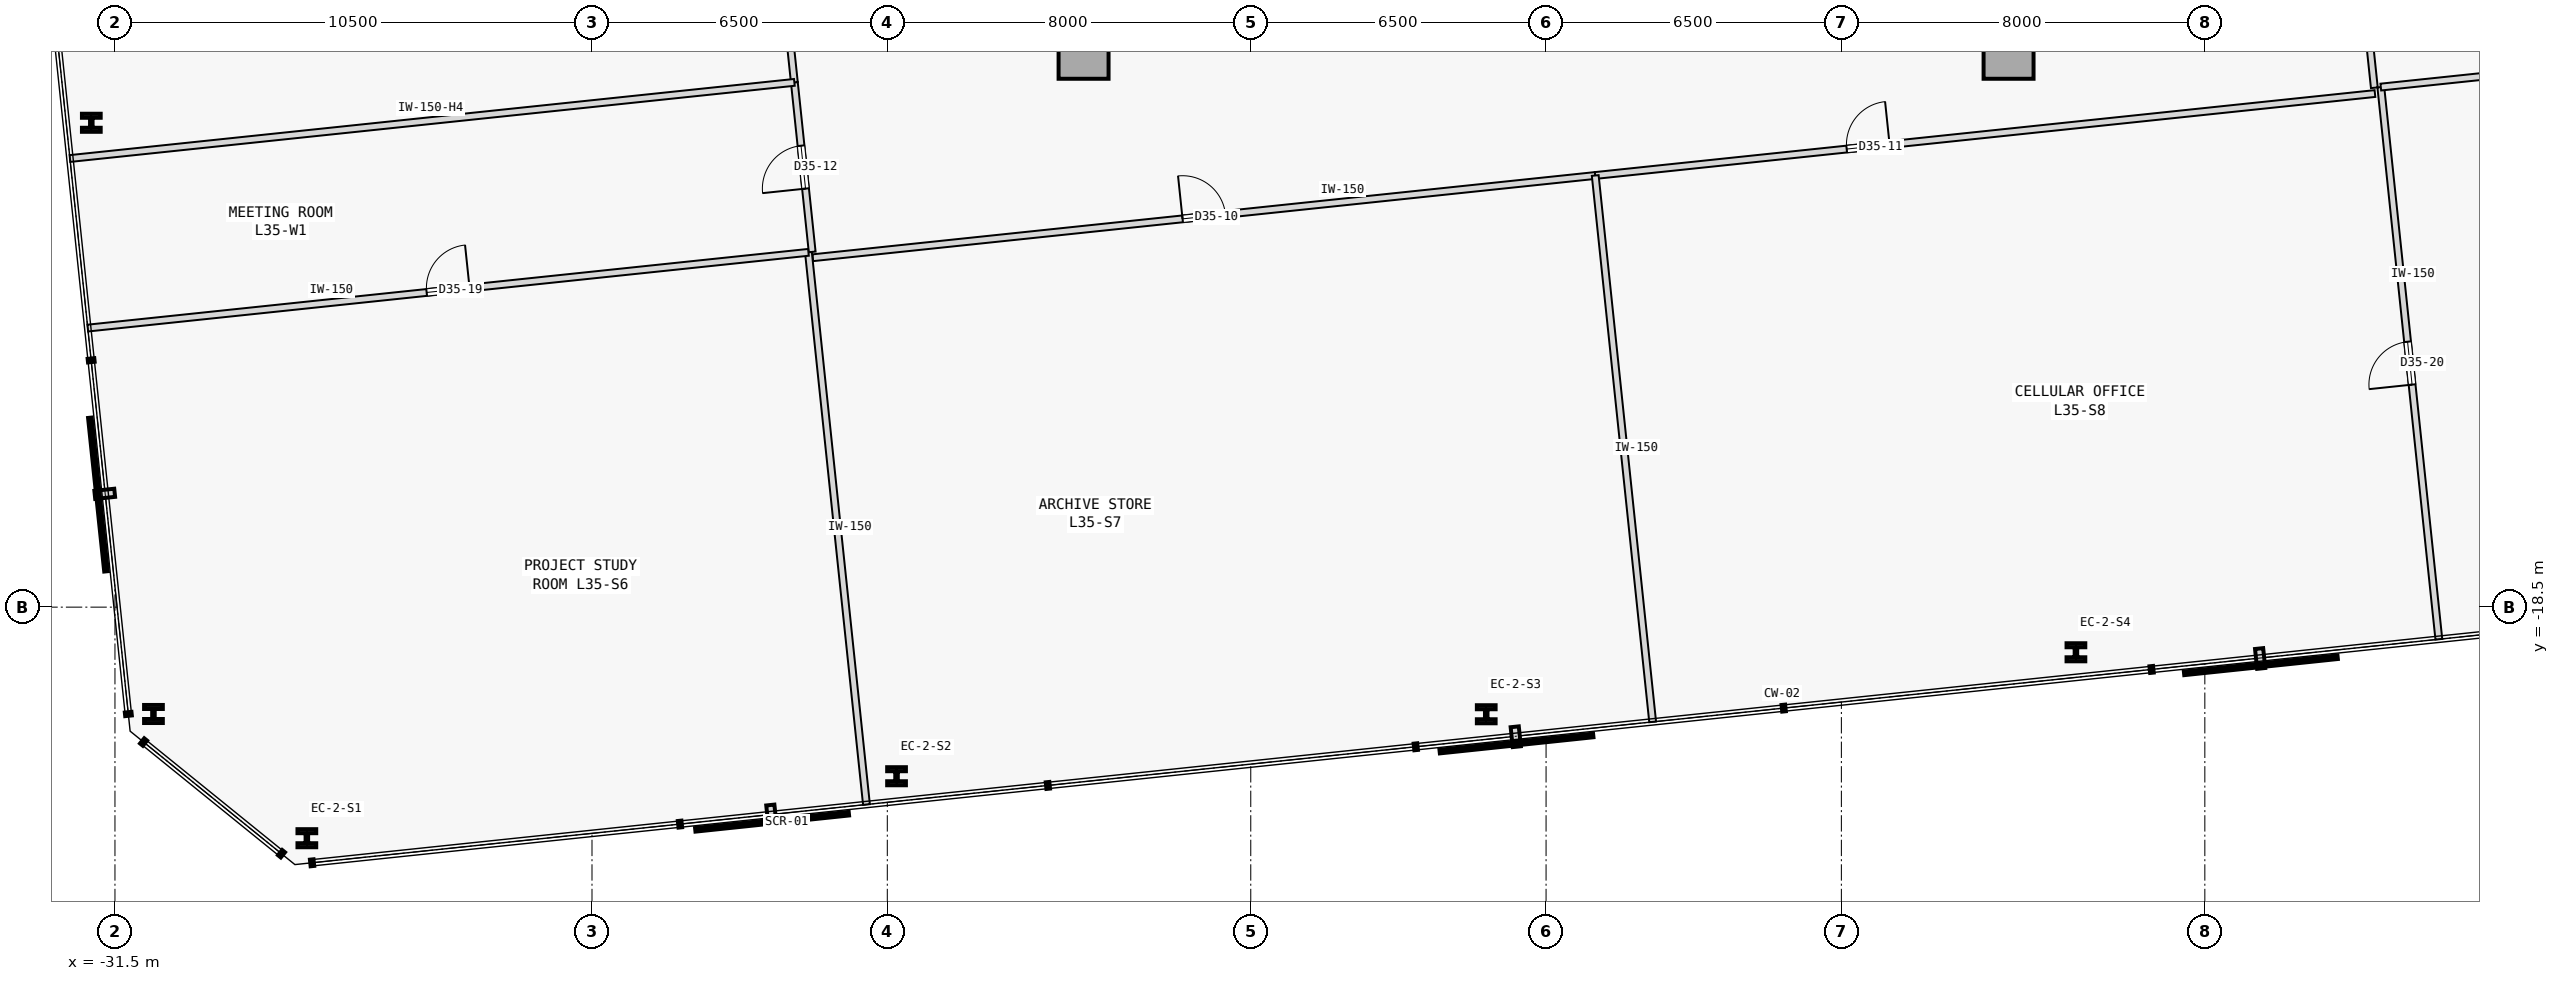
"""IFC4 building model, lengths in metres.
Left out: names, types, materials, properties, quantities, classifications, styles, units other than length and angle.
Written with IfcOpenShell. Run it as: python <this file> out.ifc"""

import sys

from ifc_helpers import new_model, si_unit, direction, frame, frame_2d, origin, origin_2d, place, context, subcontext, project, spatial, rectangle, i_section, extrude, element, fill, save


model = new_model("IFC4")
c1 = context("Model", 3, precision=1e-05, world=origin(), true_north=direction((0.0, 1.0)))
c2 = subcontext(c1, "Body", "Model", "MODEL_VIEW")
j1 = project(units=[si_unit("LENGTHUNIT", "METRE"), si_unit("PLANEANGLEUNIT", "RADIAN")], contexts=[c1])
p1 = place(None, origin())
s1 = spatial("IfcSite", under=j1, at=p1, CompositionType="ELEMENT")
p2 = place(p1, origin())
s2 = spatial("IfcBuilding", under=s1, at=p2, CompositionType="ELEMENT")
p3 = place(p2, frame((0.0, 0.0, 139.2)))
s3 = spatial("IfcBuildingStorey", under=s2, at=p3, CompositionType="ELEMENT", Elevation=139.2)
for number, where, z_axis, x_axis in (
    (1, (-10.18, -6.32, 0.0), (0.0, 0.0, 1.0), (1.0, 0.0, 0.0)),
    (2, (10.18, -6.32, 0.0), (0.0, 0.0, 1.0), (1.0, 0.0, 0.0)),
):
    element("IfcColumn", number, at=place(p3, frame(where, z_axis=z_axis, x_axis=x_axis)), inside=s3, PredefinedType="COLUMN", context=c2, shape_type="SweptSolid", body=[
        extrude(rectangle(XDim=1.1, YDim=1.1, at=origin_2d()), origin(), (0.0, 0.0, 1.0), 3.7),
    ])
for number, where, z_axis, x_axis in (
    (3, (-27.276, -23.586, 0.0), (0.0, 0.0, 1.0), (1.0, 0.0, 0.0)),
    (4, (-14.297, -22.222, 0.0), (0.0, 0.0, 1.0), (1.0, 0.0, 0.0)),
    (5, (-1.317, -20.858, 0.0), (0.0, 0.0, 1.0), (1.0, 0.0, 0.0)),
    (6, (11.663, -19.494, 0.0), (0.0, 0.0, 1.0), (1.0, 0.0, 0.0)),
    (7, (-32.021, -7.838, 0.0), (0.0, 0.0, 1.0), (1.0, 0.0, 0.0)),
    (8, (-30.653, -20.852, 0.0), (0.0, 0.0, 1.0), (1.0, 0.0, 0.0)),
):
    element("IfcColumn", number, at=place(p3, frame(where, z_axis=z_axis, x_axis=x_axis)), inside=s3, PredefinedType="COLUMN", context=c2, shape_type="SweptSolid", body=[
        extrude(i_section(OverallWidth=0.413, OverallDepth=0.398, WebThickness=0.056, FlangeThickness=0.089, FilletRadius=0.015, at=origin_2d()), origin(), (0.0, 0.0, 1.0), 3.7),
    ])
p4 = place(p3, frame((-16.14, -10.809, 0.0), z_axis=(0.0, 0.0, 1.0), x_axis=(0.994522126729, 0.104526261998, 0.0)))
e9 = element("IfcWall", 9, at=p4, inside=s3, PredefinedType="PARTITIONING", context=c2, shape_type="SweptSolid", body=[
    extrude(rectangle(XDim=17.317, YDim=0.15, at=frame_2d((8.658, 0.0))), origin(), (0.0, 0.0, 1.0), 3.3),
])
p5 = place(p4, frame((8.184, 0.0, 0.0)))
e10 = element("IfcOpeningElement", 10, at=p5, cuts=e9, PredefinedType="OPENING", context=c2, shape_type="SweptSolid", body=[
    extrude(rectangle(XDim=0.95, YDim=2.15, at=frame_2d((0.475, 1.075))), frame((0.0, 0.085, 0.0), z_axis=(0.0, -1.0, 0.0), x_axis=(1.0, 0.0, 0.0)), (0.0, 0.0, 1.0), 0.17),
])
p6 = place(p3, frame((1.082, -8.999, 0.0), z_axis=(0.0, 0.0, 1.0), x_axis=(0.994522803526, 0.104519822363, 0.0)))
e11 = element("IfcWall", 11, at=p6, inside=s3, PredefinedType="PARTITIONING", context=c2, shape_type="SweptSolid", body=[
    extrude(rectangle(XDim=17.257, YDim=0.15, at=frame_2d((8.628, 0.0))), origin(), (0.0, 0.0, 1.0), 3.3),
])
p7 = place(p6, frame((5.565, 0.0, 0.0)))
e12 = element("IfcOpeningElement", 12, at=p7, cuts=e11, PredefinedType="OPENING", context=c2, shape_type="SweptSolid", body=[
    extrude(rectangle(XDim=0.95, YDim=2.15, at=frame_2d((0.475, 1.075))), frame((0.0, 0.085, 0.0), z_axis=(0.0, -1.0, 0.0), x_axis=(1.0, 0.0, 0.0)), (0.0, 0.0, 1.0), 0.17),
])
p8 = place(p3, frame((-16.153, -10.682, 0.0), z_axis=(0.0, 0.0, 1.0), x_axis=(-0.104539173002, 0.994520769671, 0.0)))
e13 = element("IfcWall", 13, at=p8, inside=s3, PredefinedType="PARTITIONING", context=c2, shape_type="SweptSolid", body=[
    extrude(rectangle(XDim=3.753, YDim=0.15, at=frame_2d((1.876, 0.0))), origin(), (0.0, 0.0, 1.0), 3.3),
])
p9 = place(p8, frame((1.402, 0.0, 0.0)))
e14 = element("IfcOpeningElement", 14, at=p9, cuts=e13, PredefinedType="OPENING", context=c2, shape_type="SweptSolid", body=[
    extrude(rectangle(XDim=0.95, YDim=2.15, at=frame_2d((0.475, 1.075))), frame((0.0, 0.085, 0.0), z_axis=(0.0, -1.0, 0.0), x_axis=(1.0, 0.0, 0.0)), (0.0, 0.0, 1.0), 0.17),
])
p10 = place(p3, frame((-16.546, -6.949, 0.0), z_axis=(0.0, 0.0, 1.0), x_axis=(-0.104520314957, 0.994522751756, 0.0)))
e15 = element("IfcWall", 15, at=p10, inside=s3, PredefinedType="PARTITIONING", context=c2, shape_type="SweptSolid", body=[
    extrude(rectangle(XDim=5.718, YDim=0.15, at=frame_2d((2.859, 0.0))), origin(), (0.0, 0.0, 1.0), 3.3),
])
p11 = place(p10, frame((3.242, 0.0, 0.0)))
e16 = element("IfcOpeningElement", 16, at=p11, cuts=e15, PredefinedType="OPENING", context=c2, shape_type="SweptSolid", body=[
    extrude(rectangle(XDim=0.95, YDim=2.15, at=frame_2d((0.475, 1.075))), frame((0.0, 0.085, 0.0), z_axis=(0.0, -1.0, 0.0), x_axis=(1.0, 0.0, 0.0)), (0.0, 0.0, 1.0), 0.17),
])
p12 = place(p3, frame((18.231, -7.068, 0.0), z_axis=(0.0, 0.0, 1.0), x_axis=(-0.104536082083, 0.994521094569, 0.0)))
e17 = element("IfcWall", 17, at=p12, inside=s3, PredefinedType="PARTITIONING", context=c2, shape_type="SweptSolid", body=[
    extrude(rectangle(XDim=11.794, YDim=0.15, at=frame_2d((5.897, 0.0))), origin(), (0.0, 0.0, 1.0), 3.3),
])
p13 = place(p12, frame((5.422, 0.0, 0.0)))
e18 = element("IfcOpeningElement", 18, at=p13, cuts=e17, PredefinedType="OPENING", context=c2, shape_type="SweptSolid", body=[
    extrude(rectangle(XDim=0.95, YDim=2.15, at=frame_2d((0.475, 1.075))), frame((0.0, 0.085, 0.0), z_axis=(0.0, -1.0, 0.0), x_axis=(1.0, 0.0, 0.0)), (0.0, 0.0, 1.0), 0.17),
])
p14 = place(p3, frame((-14.958, -22.844, 0.0), z_axis=(0.0, 0.0, 1.0), x_axis=(-0.104540236679, 0.994520657862, 0.0)))
e19 = element("IfcWall", 19, at=p14, inside=s3, PredefinedType="PARTITIONING", context=c2, shape_type="SweptSolid", body=[
    extrude(rectangle(XDim=12.221, YDim=0.15, at=frame_2d((6.11, 0.0))), origin(), (0.0, 0.0, 1.0), 3.3),
])
p15 = place(p3, frame((-32.099, -12.358, 0.0), z_axis=(0.0, 0.0, 1.0), x_axis=(0.994521795881, 0.104529409818, 0.0)))
e20 = element("IfcWall", 20, at=p15, inside=s3, PredefinedType="PARTITIONING", context=c2, shape_type="SweptSolid", body=[
    extrude(rectangle(XDim=15.95, YDim=0.15, at=frame_2d((7.975, 0.0))), origin(), (0.0, 0.0, 1.0), 3.3),
])
p16 = place(p15, frame((7.5, 0.0, 0.0)))
e21 = element("IfcOpeningElement", 21, at=p16, cuts=e20, PredefinedType="OPENING", context=c2, shape_type="SweptSolid", body=[
    extrude(rectangle(XDim=0.95, YDim=2.15, at=frame_2d((0.475, 1.075))), frame((0.0, 0.085, 0.0), z_axis=(0.0, -1.0, 0.0), x_axis=(1.0, 0.0, 0.0)), (0.0, 0.0, 1.0), 0.17),
])
p17 = place(p3, frame((2.346, -21.026, 0.0), z_axis=(0.0, 0.0, 1.0), x_axis=(-0.104535555083, 0.994521149963, 0.0)))
e22 = element("IfcWall", 22, at=p17, inside=s3, PredefinedType="PARTITIONING", context=c2, shape_type="SweptSolid", body=[
    extrude(rectangle(XDim=12.093, YDim=0.15, at=frame_2d((6.046, 0.0))), origin(), (0.0, 0.0, 1.0), 3.3),
])
p18 = place(p3, frame((19.651, -19.207, 0.0), z_axis=(0.0, 0.0, 1.0), x_axis=(-0.104540236679, 0.994520657862, 0.0)))
e23 = element("IfcWall", 23, at=p18, inside=s3, PredefinedType="PARTITIONING", context=c2, shape_type="SweptSolid", body=[
    extrude(rectangle(XDim=12.221, YDim=0.15, at=frame_2d((6.11, 0.0))), origin(), (0.0, 0.0, 1.0), 3.3),
])
p19 = place(p18, frame((5.635, 0.0, 0.0)))
e24 = element("IfcOpeningElement", 24, at=p19, cuts=e23, PredefinedType="OPENING", context=c2, shape_type="SweptSolid", body=[
    extrude(rectangle(XDim=0.95, YDim=2.15, at=frame_2d((0.475, 1.075))), frame((0.0, 0.085, 0.0), z_axis=(0.0, -1.0, 0.0), x_axis=(1.0, 0.0, 0.0)), (0.0, 0.0, 1.0), 0.17),
])
p20 = place(p3, frame((18.373, -7.053, 0.0), z_axis=(0.0, 0.0, 1.0), x_axis=(0.994521010406, 0.104536882776, 0.0)))
e25 = element("IfcWall", 25, at=p20, inside=s3, PredefinedType="PARTITIONING", context=c2, shape_type="SweptSolid", body=[
    extrude(rectangle(XDim=11.6, YDim=0.15, at=frame_2d((5.8, 0.0))), origin(), (0.0, 0.0, 1.0), 3.3),
])
p21 = place(p3, frame((-32.491, -8.625, 0.0), z_axis=(0.0, 0.0, 1.0), x_axis=(0.994522794159, 0.104519911488, 0.0)))
e26 = element("IfcWall", 26, at=p21, inside=s3, PredefinedType="PARTITIONING", context=c2, shape_type="SweptSolid", body=[
    extrude(rectangle(XDim=16.033, YDim=0.15, at=frame_2d((8.017, 0.0))), origin(), (0.0, 0.0, 1.0), 2.24),
])
p22 = place(p5, origin())
e27 = element("IfcDoor", 27, at=p22, inside=s3, OperationType="SINGLE_SWING_LEFT", PredefinedType="DOOR", context=c2, shape_type="SweptSolid", body=[
    extrude(rectangle(XDim=0.95, YDim=2.15, at=frame_2d((0.475, 1.075))), frame((0.0, 0.025, 0.0), z_axis=(0.0, -1.0, 0.0), x_axis=(1.0, 0.0, 0.0)), (0.0, 0.0, 1.0), 0.05),
])
fill(e10, e27)
p23 = place(p7, origin())
e28 = element("IfcDoor", 28, at=p23, inside=s3, OperationType="SINGLE_SWING_RIGHT", PredefinedType="DOOR", context=c2, shape_type="SweptSolid", body=[
    extrude(rectangle(XDim=0.95, YDim=2.15, at=frame_2d((0.475, 1.075))), frame((0.0, 0.025, 0.0), z_axis=(0.0, -1.0, 0.0), x_axis=(1.0, 0.0, 0.0)), (0.0, 0.0, 1.0), 0.05),
])
fill(e12, e28)
p24 = place(p9, origin())
e29 = element("IfcDoor", 29, at=p24, inside=s3, OperationType="SINGLE_SWING_LEFT", PredefinedType="DOOR", context=c2, shape_type="SweptSolid", body=[
    extrude(rectangle(XDim=0.95, YDim=2.15, at=frame_2d((0.475, 1.075))), frame((0.0, 0.025, 0.0), z_axis=(0.0, -1.0, 0.0), x_axis=(1.0, 0.0, 0.0)), (0.0, 0.0, 1.0), 0.05),
])
fill(e14, e29)
p25 = place(p16, origin())
e30 = element("IfcDoor", 30, at=p25, inside=s3, OperationType="SINGLE_SWING_RIGHT", PredefinedType="DOOR", context=c2, shape_type="SweptSolid", body=[
    extrude(rectangle(XDim=0.95, YDim=2.15, at=frame_2d((0.475, 1.075))), frame((0.0, 0.025, 0.0), z_axis=(0.0, -1.0, 0.0), x_axis=(1.0, 0.0, 0.0)), (0.0, 0.0, 1.0), 0.05),
])
fill(e21, e30)
p26 = place(p19, origin())
e31 = element("IfcDoor", 31, at=p26, inside=s3, OperationType="SINGLE_SWING_LEFT", PredefinedType="DOOR", context=c2, shape_type="SweptSolid", body=[
    extrude(rectangle(XDim=0.95, YDim=2.15, at=frame_2d((0.475, 1.075))), frame((0.0, 0.025, 0.0), z_axis=(0.0, -1.0, 0.0), x_axis=(1.0, 0.0, 0.0)), (0.0, 0.0, 1.0), 0.05),
])
fill(e24, e31)
save(model, sys.argv[1])
